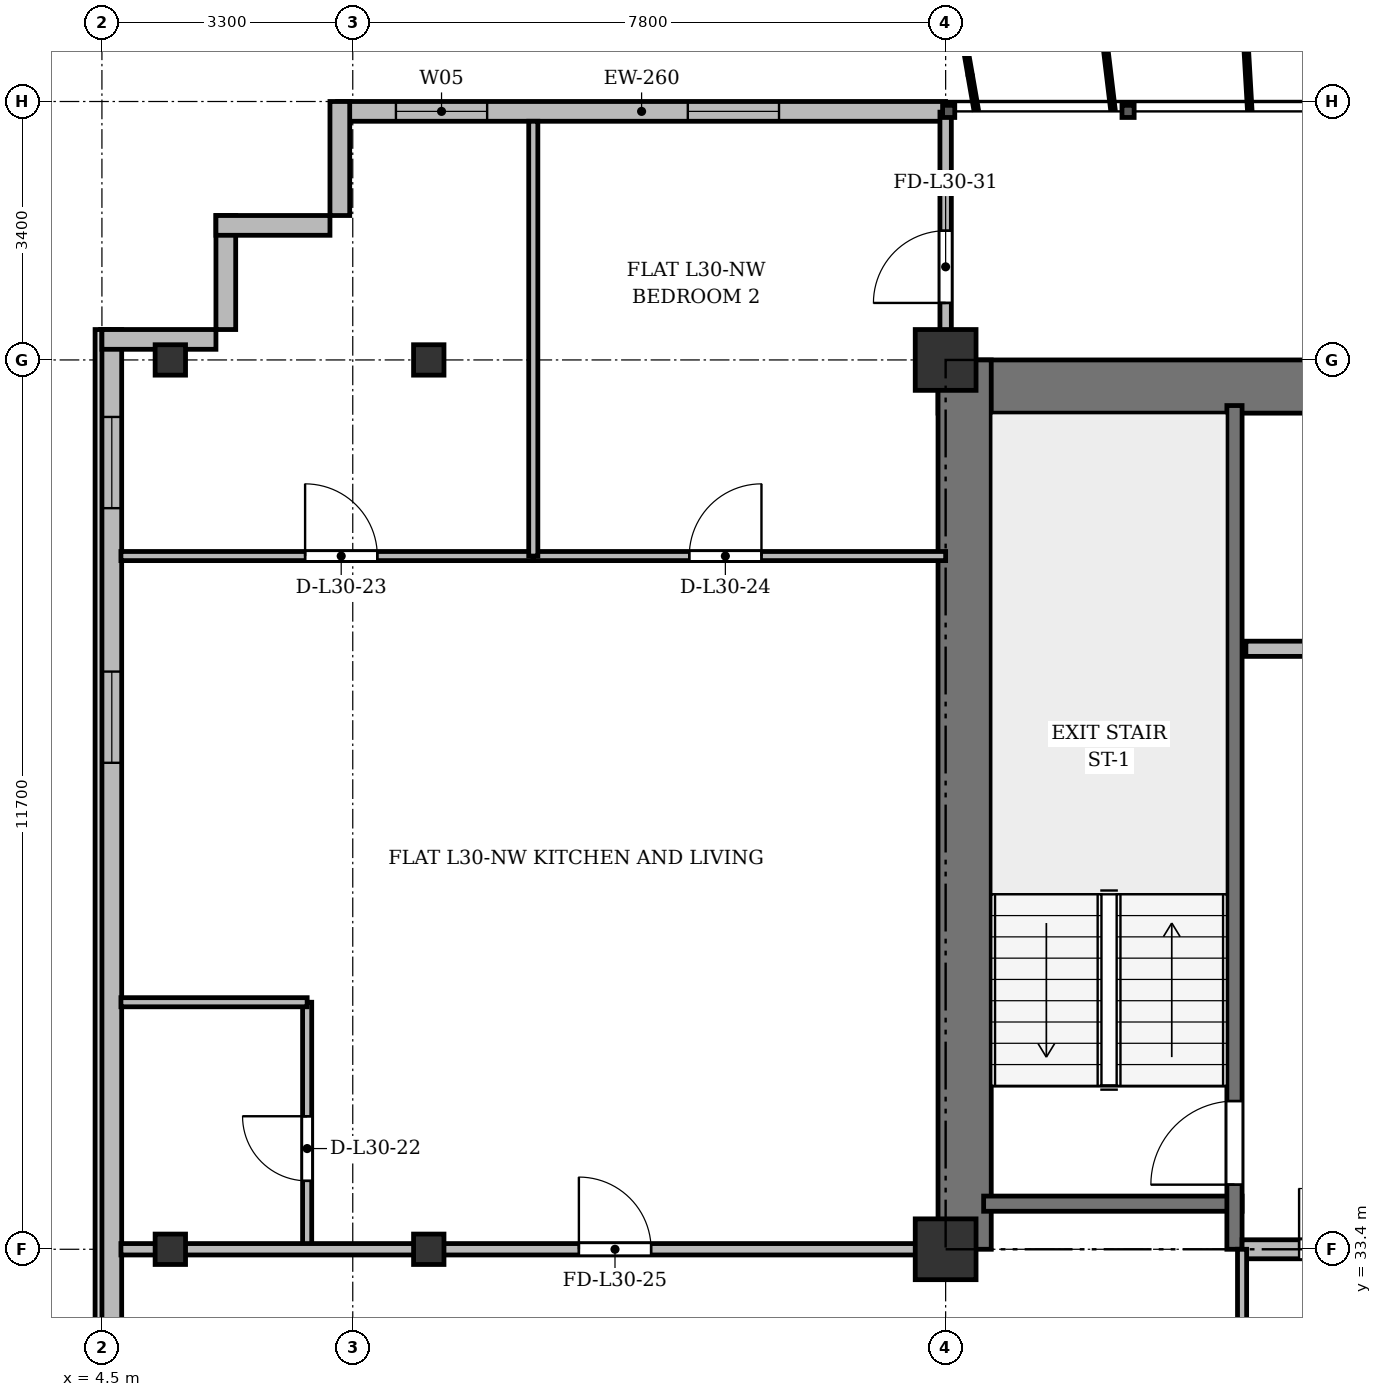
"""IFC4 building model, lengths in metres.
Left out: names, types, materials, properties, quantities, classifications, styles, units other than length and angle.
Written with IfcOpenShell. Run it as: python <this file> out.ifc"""

import sys

from ifc_helpers import new_model, si_unit, direction, frame, frame_2d, origin, origin_2d, place, context, subcontext, project, spatial, rectangle, i_section, extrude, source, transform, mapped, element, fill, save


model = new_model("IFC4")
c1 = context("Model", 3, precision=1e-05, world=origin(), true_north=direction((0.0, 1.0)))
c2 = subcontext(c1, "Body", "Model", "MODEL_VIEW")
j1 = project(units=[si_unit("LENGTHUNIT", "METRE"), si_unit("PLANEANGLEUNIT", "RADIAN")], contexts=[c1])
p1 = place(None, origin())
s1 = spatial("IfcSite", under=j1, at=p1, CompositionType="ELEMENT")
p2 = place(p1, origin())
s2 = spatial("IfcBuilding", under=s1, at=p2, CompositionType="ELEMENT")
p3 = place(p2, frame((0.0, 0.0, 117.7)))
s3 = spatial("IfcBuildingStorey", under=s2, at=p3, CompositionType="ELEMENT", Elevation=117.7)
m1 = source(origin(), c2, "Body", "SweptSolid", [
    extrude(i_section(OverallWidth=0.4, OverallDepth=0.4, WebThickness=0.022, FlangeThickness=0.035, at=origin_2d()), origin(), (0.0, 0.0, 1.0), 3.6),
])
for number, where, z_axis, x_axis in (
    (1, (5.4, 33.4, 0.0), (0.0, 0.0, 1.0), (1.0, 0.0, 0.0)),
    (2, (5.4, 45.1, 0.0), (0.0, 0.0, 1.0), (1.0, 0.0, 0.0)),
    (3, (8.8, 33.4, 0.0), (0.0, 0.0, 1.0), (1.0, 0.0, 0.0)),
    (4, (8.8, 45.1, 0.0), (0.0, 0.0, 1.0), (1.0, 0.0, 0.0)),
):
    element("IfcColumn", number, at=place(p3, frame(where, z_axis=z_axis, x_axis=x_axis)), inside=s3, PredefinedType="COLUMN", context=c2, shape_type="MappedRepresentation", body=[
        mapped(m1, transform((0.0, 0.0, 0.0), x_axis=(1.0, 0.0, 0.0), y_axis=(0.0, 1.0, 0.0), z_axis=(0.0, 0.0, 1.0), scale=1.0)),
    ])
m2 = source(origin(), c2, "Body", "SweptSolid", [
    extrude(rectangle(XDim=0.8, YDim=0.8, at=origin_2d()), origin(), (0.0, 0.0, 1.0), 3.6),
])
for number, where, z_axis, x_axis in (
    (5, (15.6, 33.4, 0.0), (0.0, 0.0, 1.0), (1.0, 0.0, 0.0)),
    (6, (15.6, 45.1, 0.0), (0.0, 0.0, 1.0), (1.0, 0.0, 0.0)),
):
    element("IfcColumn", number, at=place(p3, frame(where, z_axis=z_axis, x_axis=x_axis)), inside=s3, PredefinedType="COLUMN", context=c2, shape_type="MappedRepresentation", body=[
        mapped(m2, transform((0.0, 0.0, 0.0), x_axis=(1.0, 0.0, 0.0), y_axis=(0.0, 1.0, 0.0), z_axis=(0.0, 0.0, 1.0), scale=1.0)),
    ])
p4 = place(p3, frame((7.6, 48.37, 0.0), z_axis=(0.0, 0.0, 1.0), x_axis=(1.0, 0.0, 0.0)))
e7 = element("IfcWall", 7, at=p4, inside=s3, PredefinedType="SOLIDWALL", context=c2, shape_type="SweptSolid", body=[
    extrude(rectangle(XDim=8.0, YDim=0.26, at=frame_2d((4.0, 0.0))), origin(), (0.0, 0.0, 1.0), 3.34),
])
p5 = place(p4, frame((0.768, 0.0, 0.9)))
e8 = element("IfcOpeningElement", 8, at=p5, cuts=e7, PredefinedType="OPENING", context=c2, shape_type="SweptSolid", body=[
    extrude(rectangle(XDim=1.2, YDim=1.65, at=frame_2d((0.6, 0.825))), frame((0.0, 0.14, 0.0), z_axis=(0.0, -1.0, 0.0), x_axis=(1.0, 0.0, 0.0)), (0.0, 0.0, 1.0), 0.28),
])
p6 = place(p4, frame((4.608, 0.0, 0.9)))
e9 = element("IfcOpeningElement", 9, at=p6, cuts=e7, PredefinedType="OPENING", context=c2, shape_type="SweptSolid", body=[
    extrude(rectangle(XDim=1.2, YDim=1.65, at=frame_2d((0.6, 0.825))), frame((0.0, 0.14, 0.0), z_axis=(0.0, -1.0, 0.0), x_axis=(1.0, 0.0, 0.0)), (0.0, 0.0, 1.0), 0.28),
])
p7 = place(p3, frame((4.63, 5.9, 0.0), z_axis=(0.0, 0.0, 1.0), x_axis=(0.0, 1.0, 0.0)))
e10 = element("IfcWall", 10, at=p7, inside=s3, PredefinedType="SOLIDWALL", context=c2, shape_type="SweptSolid", body=[
    extrude(rectangle(XDim=39.6, YDim=0.26, at=frame_2d((19.8, 0.0))), origin(), (0.0, 0.0, 1.0), 3.34),
])
p8 = place(p7, frame((1.45, 0.0, 0.92)))
e11 = element("IfcOpeningElement", 11, at=p8, cuts=e10, PredefinedType="OPENING", context=c2, shape_type="SweptSolid", body=[
    extrude(rectangle(XDim=1.2, YDim=1.65, at=frame_2d((0.6, 0.825))), frame((0.0, 0.14, 0.0), z_axis=(0.0, -1.0, 0.0), x_axis=(1.0, 0.0, 0.0)), (0.0, 0.0, 1.0), 0.28),
])
p9 = place(p7, frame((4.2, 0.0, 0.92)))
e12 = element("IfcOpeningElement", 12, at=p9, cuts=e10, PredefinedType="OPENING", context=c2, shape_type="SweptSolid", body=[
    extrude(rectangle(XDim=2.6, YDim=1.9, at=frame_2d((1.3, 0.95))), frame((0.0, 0.14, 0.0), z_axis=(0.0, -1.0, 0.0), x_axis=(1.0, 0.0, 0.0)), (0.0, 0.0, 1.0), 0.28),
])
p10 = place(p7, frame((8.4, 0.0, 0.92)))
e13 = element("IfcOpeningElement", 13, at=p10, cuts=e10, PredefinedType="OPENING", context=c2, shape_type="SweptSolid", body=[
    extrude(rectangle(XDim=2.6, YDim=1.9, at=frame_2d((1.3, 0.95))), frame((0.0, 0.14, 0.0), z_axis=(0.0, -1.0, 0.0), x_axis=(1.0, 0.0, 0.0)), (0.0, 0.0, 1.0), 0.28),
])
p11 = place(p7, frame((15.6, 0.0, 0.92)))
e14 = element("IfcOpeningElement", 14, at=p11, cuts=e10, PredefinedType="OPENING", context=c2, shape_type="SweptSolid", body=[
    extrude(rectangle(XDim=2.6, YDim=1.9, at=frame_2d((1.3, 0.95))), frame((0.0, 0.14, 0.0), z_axis=(0.0, -1.0, 0.0), x_axis=(1.0, 0.0, 0.0)), (0.0, 0.0, 1.0), 0.28),
])
p12 = place(p7, frame((33.9, 0.0, 0.92)))
e15 = element("IfcOpeningElement", 15, at=p12, cuts=e10, PredefinedType="OPENING", context=c2, shape_type="SweptSolid", body=[
    extrude(rectangle(XDim=1.2, YDim=1.65, at=frame_2d((0.6, 0.825))), frame((0.0, 0.14, 0.0), z_axis=(0.0, -1.0, 0.0), x_axis=(1.0, 0.0, 0.0)), (0.0, 0.0, 1.0), 0.28),
])
p13 = place(p7, frame((37.25, 0.0, 0.92)))
e16 = element("IfcOpeningElement", 16, at=p13, cuts=e10, PredefinedType="OPENING", context=c2, shape_type="SweptSolid", body=[
    extrude(rectangle(XDim=1.2, YDim=1.65, at=frame_2d((0.6, 0.825))), frame((0.0, 0.14, 0.0), z_axis=(0.0, -1.0, 0.0), x_axis=(1.0, 0.0, 0.0)), (0.0, 0.0, 1.0), 0.28),
])
p14 = place(p3, frame((4.5, 45.37, 0.0), z_axis=(0.0, 0.0, 1.0), x_axis=(1.0, 0.0, 0.0)))
e17 = element("IfcWall", 17, at=p14, inside=s3, PredefinedType="SOLIDWALL", context=c2, shape_type="SweptSolid", body=[
    extrude(rectangle(XDim=1.5, YDim=0.26, at=frame_2d((0.75, 0.0))), origin(), (0.0, 0.0, 1.0), 2.752),
])
for number, where, z_axis, x_axis in (
    (18, (6.13, 45.5, 0.0), (0.0, 0.0, 1.0), (0.0, 1.0, 0.0)),
    (19, (6.0, 46.87, 0.0), (0.0, 0.0, 1.0), (1.0, 0.0, 0.0)),
    (20, (7.63, 47.0, 0.0), (0.0, 0.0, 1.0), (0.0, 1.0, 0.0)),
):
    element("IfcWall", number, at=place(p3, frame(where, z_axis=z_axis, x_axis=x_axis)), inside=s3, PredefinedType="SOLIDWALL", context=c2, shape_type="SweptSolid", body=[
        extrude(rectangle(XDim=1.5, YDim=0.26, at=frame_2d((0.75, 0.0))), origin(), (0.0, 0.0, 1.0), 3.34),
    ])
p15 = place(p3, frame((15.5, 44.75, 0.0), z_axis=(0.0, 0.0, 1.0), x_axis=(1.0, 0.0, 0.0)))
e21 = element("IfcWall", 21, at=p15, inside=s3, PredefinedType="SHEAR", context=c2, shape_type="SweptSolid", body=[
    extrude(rectangle(XDim=43.4, YDim=0.7, at=frame_2d((21.7, 0.0))), origin(), (0.0, 0.0, 1.0), 3.34),
])
p16 = place(p3, frame((15.85, 33.4, 0.0), z_axis=(0.0, 0.0, 1.0), x_axis=(0.0, 1.0, 0.0)))
e22 = element("IfcWall", 22, at=p16, inside=s3, PredefinedType="SHEAR", context=c2, shape_type="SweptSolid", body=[
    extrude(rectangle(XDim=11.7, YDim=0.7, at=frame_2d((5.85, 0.0))), origin(), (0.0, 0.0, 1.0), 3.34),
])
p17 = place(p3, frame((16.1, 34.0, 0.0), z_axis=(0.0, 0.0, 1.0), x_axis=(1.0, 0.0, 0.0)))
e23 = element("IfcWall", 23, at=p17, inside=s3, PredefinedType="SHEAR", context=c2, shape_type="SweptSolid", body=[
    extrude(rectangle(XDim=3.4, YDim=0.2, at=frame_2d((1.7, 0.0))), origin(), (0.0, 0.0, 1.0), 3.34),
])
p18 = place(p3, frame((19.4, 33.4, 0.0), z_axis=(0.0, 0.0, 1.0), x_axis=(0.0, 1.0, 0.0)))
e24 = element("IfcWall", 24, at=p18, inside=s3, PredefinedType="SHEAR", context=c2, shape_type="SweptSolid", body=[
    extrude(rectangle(XDim=11.1, YDim=0.2, at=frame_2d((5.55, 0.0))), origin(), (0.0, 0.0, 1.0), 3.34),
])
p19 = place(p18, frame((0.85, 0.0, 0.0)))
e25 = element("IfcOpeningElement", 25, at=p19, cuts=e24, PredefinedType="OPENING", context=c2, shape_type="SweptSolid", body=[
    extrude(rectangle(XDim=1.1, YDim=2.15, at=frame_2d((0.55, 1.075))), frame((0.0, 0.11, 0.0), z_axis=(0.0, -1.0, 0.0), x_axis=(1.0, 0.0, 0.0)), (0.0, 0.0, 1.0), 0.22),
])
p20 = place(p3, frame((19.55, 41.3, 0.0), z_axis=(0.0, 0.0, 1.0), x_axis=(1.0, 0.0, 0.0)))
e26 = element("IfcWall", 26, at=p20, inside=s3, PredefinedType="SOLIDWALL", context=c2, shape_type="SweptSolid", body=[
    extrude(rectangle(XDim=6.75, YDim=0.2, at=frame_2d((3.375, 0.0))), origin(), (0.0, 0.0, 1.0), 3.34),
])
p21 = place(p20, frame((1.7, 0.0, 0.0)))
e27 = element("IfcOpeningElement", 27, at=p21, cuts=e26, PredefinedType="OPENING", context=c2, shape_type="SweptSolid", body=[
    extrude(rectangle(XDim=1.1, YDim=2.15, at=frame_2d((0.55, 1.075))), frame((0.0, 0.11, 0.0), z_axis=(0.0, -1.0, 0.0), x_axis=(1.0, 0.0, 0.0)), (0.0, 0.0, 1.0), 0.22),
])
p22 = place(p20, frame((4.4, 0.0, 0.0)))
e28 = element("IfcOpeningElement", 28, at=p22, cuts=e26, PredefinedType="OPENING", context=c2, shape_type="SweptSolid", body=[
    extrude(rectangle(XDim=1.1, YDim=2.15, at=frame_2d((0.55, 1.075))), frame((0.0, 0.11, 0.0), z_axis=(0.0, -1.0, 0.0), x_axis=(1.0, 0.0, 0.0)), (0.0, 0.0, 1.0), 0.22),
])
p23 = place(p3, frame((19.5, 33.4, 0.0), z_axis=(0.0, 0.0, 1.0), x_axis=(1.0, 0.0, 0.0)))
e29 = element("IfcWall", 29, at=p23, inside=s3, PredefinedType="PARTITIONING", context=c2, shape_type="SweptSolid", body=[
    extrude(rectangle(XDim=6.8, YDim=0.25, at=frame_2d((3.4, 0.0))), origin(), (0.0, 0.0, 1.0), 2.752),
])
p24 = place(p23, frame((0.75, 0.0, 0.0)))
e30 = element("IfcOpeningElement", 30, at=p24, cuts=e29, PredefinedType="OPENING", context=c2, shape_type="SweptSolid", body=[
    extrude(rectangle(XDim=1.6, YDim=2.2, at=frame_2d((0.8, 1.1))), frame((0.0, 0.135, 0.0), z_axis=(0.0, -1.0, 0.0), x_axis=(1.0, 0.0, 0.0)), (0.0, 0.0, 1.0), 0.27),
])
p25 = place(p3, frame((19.5, 29.8, 0.0), z_axis=(0.0, 0.0, 1.0), x_axis=(0.0, 1.0, 0.0)))
e31 = element("IfcWall", 31, at=p25, inside=s3, PredefinedType="PARTITIONING", context=c2, shape_type="SweptSolid", body=[
    extrude(rectangle(XDim=3.6, YDim=0.12, at=frame_2d((1.8, 0.0))), origin(), (0.0, 0.0, 1.0), 2.752),
])
p26 = place(p3, frame((7.2, 33.4, 0.0), z_axis=(0.0, 0.0, 1.0), x_axis=(0.0, 1.0, 0.0)))
e32 = element("IfcWall", 32, at=p26, inside=s3, PredefinedType="PARTITIONING", context=c2, shape_type="SweptSolid", body=[
    extrude(rectangle(XDim=3.25, YDim=0.12, at=frame_2d((1.625, 0.0))), origin(), (0.0, 0.0, 1.0), 2.752),
])
p27 = place(p26, frame((0.9, 0.0, 0.0)))
e33 = element("IfcOpeningElement", 33, at=p27, cuts=e32, PredefinedType="OPENING", context=c2, shape_type="SweptSolid", body=[
    extrude(rectangle(XDim=0.85, YDim=2.1, at=frame_2d((0.425, 1.05))), frame((0.0, 0.07, 0.0), z_axis=(0.0, -1.0, 0.0), x_axis=(1.0, 0.0, 0.0)), (0.0, 0.0, 1.0), 0.14),
])
p28 = place(p3, frame((4.75, 36.65, 0.0), z_axis=(0.0, 0.0, 1.0), x_axis=(1.0, 0.0, 0.0)))
e34 = element("IfcWall", 34, at=p28, inside=s3, PredefinedType="PARTITIONING", context=c2, shape_type="SweptSolid", body=[
    extrude(rectangle(XDim=2.45, YDim=0.12, at=frame_2d((1.225, 0.0))), origin(), (0.0, 0.0, 1.0), 2.84),
])
p29 = place(p3, frame((4.75, 42.52, 0.0), z_axis=(0.0, 0.0, 1.0), x_axis=(1.0, 0.0, 0.0)))
e35 = element("IfcWall", 35, at=p29, inside=s3, PredefinedType="PARTITIONING", context=c2, shape_type="SweptSolid", body=[
    extrude(rectangle(XDim=5.425, YDim=0.12, at=frame_2d((2.712, 0.0))), origin(), (0.0, 0.0, 1.0), 2.84),
])
p30 = place(p29, frame((2.423, 0.0, 0.0)))
e36 = element("IfcOpeningElement", 36, at=p30, cuts=e35, PredefinedType="OPENING", context=c2, shape_type="SweptSolid", body=[
    extrude(rectangle(XDim=0.95, YDim=2.15, at=frame_2d((0.475, 1.075))), frame((0.0, 0.07, 0.0), z_axis=(0.0, -1.0, 0.0), x_axis=(1.0, 0.0, 0.0)), (0.0, 0.0, 1.0), 0.14),
])
p31 = place(p3, frame((10.175, 42.52, 0.0), z_axis=(0.0, 0.0, 1.0), x_axis=(1.0, 0.0, 0.0)))
e37 = element("IfcWall", 37, at=p31, inside=s3, PredefinedType="PARTITIONING", context=c2, shape_type="SweptSolid", body=[
    extrude(rectangle(XDim=5.425, YDim=0.12, at=frame_2d((2.712, 0.0))), origin(), (0.0, 0.0, 1.0), 2.84),
])
p32 = place(p31, frame((2.052, 0.0, 0.0)))
e38 = element("IfcOpeningElement", 38, at=p32, cuts=e37, PredefinedType="OPENING", context=c2, shape_type="SweptSolid", body=[
    extrude(rectangle(XDim=0.95, YDim=2.15, at=frame_2d((0.475, 1.075))), frame((0.0, 0.07, 0.0), z_axis=(0.0, -1.0, 0.0), x_axis=(1.0, 0.0, 0.0)), (0.0, 0.0, 1.0), 0.14),
])
p33 = place(p3, frame((10.175, 42.52, 0.0), z_axis=(0.0, 0.0, 1.0), x_axis=(0.0, 1.0, 0.0)))
e39 = element("IfcWall", 39, at=p33, inside=s3, PredefinedType="PARTITIONING", context=c2, shape_type="SweptSolid", body=[
    extrude(rectangle(XDim=5.72, YDim=0.12, at=frame_2d((2.86, 0.0))), origin(), (0.0, 0.0, 1.0), 2.752),
])
p34 = place(p3, frame((4.75, 33.4, 0.0), z_axis=(0.0, 0.0, 1.0), x_axis=(1.0, 0.0, 0.0)))
e40 = element("IfcWall", 40, at=p34, inside=s3, PredefinedType="PARTITIONING", context=c2, shape_type="SweptSolid", body=[
    extrude(rectangle(XDim=10.85, YDim=0.15, at=frame_2d((5.425, 0.0))), origin(), (0.0, 0.0, 1.0), 2.752),
])
p35 = place(p34, frame((6.025, 0.0, 0.0)))
e41 = element("IfcOpeningElement", 41, at=p35, cuts=e40, PredefinedType="OPENING", context=c2, shape_type="SweptSolid", body=[
    extrude(rectangle(XDim=0.95, YDim=2.15, at=frame_2d((0.475, 1.075))), frame((0.0, 0.085, 0.0), z_axis=(0.0, -1.0, 0.0), x_axis=(1.0, 0.0, 0.0)), (0.0, 0.0, 1.0), 0.17),
])
p36 = place(p3, frame((15.6, 44.75, 0.0), z_axis=(0.0, 0.0, 1.0), x_axis=(0.0, 1.0, 0.0)))
e42 = element("IfcWall", 42, at=p36, inside=s3, PredefinedType="PARTITIONING", context=c2, shape_type="SweptSolid", body=[
    extrude(rectangle(XDim=3.61, YDim=0.15, at=frame_2d((1.805, 0.0))), origin(), (0.0, 0.0, 1.0), 2.84),
])
p37 = place(p36, frame((1.1, 0.0, 0.0)))
e43 = element("IfcOpeningElement", 43, at=p37, cuts=e42, PredefinedType="OPENING", context=c2, shape_type="SweptSolid", body=[
    extrude(rectangle(XDim=0.95, YDim=2.15, at=frame_2d((0.475, 1.075))), frame((0.0, 0.085, 0.0), z_axis=(0.0, -1.0, 0.0), x_axis=(1.0, 0.0, 0.0)), (0.0, 0.0, 1.0), 0.17),
])
m3 = source(origin(), c2, "Body", "SweptSolid", [
    extrude(rectangle(XDim=1.2, YDim=1.65, at=frame_2d((0.6, 0.825))), frame((0.0, 0.03, 0.0), z_axis=(0.0, -1.0, 0.0), x_axis=(1.0, 0.0, 0.0)), (0.0, 0.0, 1.0), 0.06),
])
p38 = place(p5, origin())
e44 = element("IfcWindow", 44, at=p38, inside=s3, PartitioningType="SINGLE_PANEL", PredefinedType="WINDOW", context=c2, shape_type="MappedRepresentation", body=[
    mapped(m3, transform((0.0, 0.0, 0.0), x_axis=(1.0, 0.0, 0.0), y_axis=(0.0, 1.0, 0.0), z_axis=(0.0, 0.0, 1.0), scale=1.0)),
])
fill(e8, e44)
p39 = place(p6, origin())
e45 = element("IfcWindow", 45, at=p39, inside=s3, PartitioningType="SINGLE_PANEL", PredefinedType="WINDOW", context=c2, shape_type="MappedRepresentation", body=[
    mapped(m3, transform((0.0, 0.0, 0.0), x_axis=(1.0, 0.0, 0.0), y_axis=(0.0, 1.0, 0.0), z_axis=(0.0, 0.0, 1.0), scale=1.0)),
])
fill(e9, e45)
p40 = place(p12, origin())
e46 = element("IfcWindow", 46, at=p40, inside=s3, PartitioningType="SINGLE_PANEL", PredefinedType="WINDOW", context=c2, shape_type="MappedRepresentation", body=[
    mapped(m3, transform((0.0, 0.0, 0.0), x_axis=(1.0, 0.0, 0.0), y_axis=(0.0, 1.0, 0.0), z_axis=(0.0, 0.0, 1.0), scale=1.0)),
])
fill(e15, e46)
p41 = place(p13, origin())
e47 = element("IfcWindow", 47, at=p41, inside=s3, PartitioningType="SINGLE_PANEL", PredefinedType="WINDOW", context=c2, shape_type="MappedRepresentation", body=[
    mapped(m3, transform((0.0, 0.0, 0.0), x_axis=(1.0, 0.0, 0.0), y_axis=(0.0, 1.0, 0.0), z_axis=(0.0, 0.0, 1.0), scale=1.0)),
])
fill(e16, e47)
m4 = source(origin(), c2, "Body", "SweptSolid", [
    extrude(rectangle(XDim=1.1, YDim=2.15, at=frame_2d((0.55, 1.075))), frame((0.0, 0.025, 0.0), z_axis=(0.0, -1.0, 0.0), x_axis=(1.0, 0.0, 0.0)), (0.0, 0.0, 1.0), 0.05),
])
p42 = place(p19, origin())
e48 = element("IfcDoor", 48, at=p42, inside=s3, OperationType="SINGLE_SWING_LEFT", PredefinedType="DOOR", context=c2, shape_type="MappedRepresentation", body=[
    mapped(m4, transform((0.0, 0.0, 0.0), x_axis=(1.0, 0.0, 0.0), y_axis=(0.0, 1.0, 0.0), z_axis=(0.0, 0.0, 1.0), scale=1.0)),
])
fill(e25, e48)
m5 = source(origin(), c2, "Body", "SweptSolid", [
    extrude(rectangle(XDim=1.6, YDim=2.2, at=frame_2d((0.8, 1.1))), frame((0.0, 0.025, 0.0), z_axis=(0.0, -1.0, 0.0), x_axis=(1.0, 0.0, 0.0)), (0.0, 0.0, 1.0), 0.05),
])
p43 = place(p24, origin())
e49 = element("IfcDoor", 49, at=p43, inside=s3, OperationType="DOUBLE_DOOR_SINGLE_SWING", PredefinedType="DOOR", context=c2, shape_type="MappedRepresentation", body=[
    mapped(m5, transform((0.0, 0.0, 0.0), x_axis=(1.0, 0.0, 0.0), y_axis=(0.0, 1.0, 0.0), z_axis=(0.0, 0.0, 1.0), scale=1.0)),
])
fill(e30, e49)
m6 = source(origin(), c2, "Body", "SweptSolid", [
    extrude(rectangle(XDim=0.85, YDim=2.1, at=frame_2d((0.425, 1.05))), frame((0.0, 0.025, 0.0), z_axis=(0.0, -1.0, 0.0), x_axis=(1.0, 0.0, 0.0)), (0.0, 0.0, 1.0), 0.05),
])
p44 = place(p27, origin())
e50 = element("IfcDoor", 50, at=p44, inside=s3, OperationType="SINGLE_SWING_RIGHT", PredefinedType="DOOR", context=c2, shape_type="MappedRepresentation", body=[
    mapped(m6, transform((0.0, 0.0, 0.0), x_axis=(1.0, 0.0, 0.0), y_axis=(0.0, 1.0, 0.0), z_axis=(0.0, 0.0, 1.0), scale=1.0)),
])
fill(e33, e50)
m7 = source(origin(), c2, "Body", "SweptSolid", [
    extrude(rectangle(XDim=0.95, YDim=2.15, at=frame_2d((0.475, 1.075))), frame((0.0, 0.025, 0.0), z_axis=(0.0, -1.0, 0.0), x_axis=(1.0, 0.0, 0.0)), (0.0, 0.0, 1.0), 0.05),
])
p45 = place(p30, origin())
e51 = element("IfcDoor", 51, at=p45, inside=s3, OperationType="SINGLE_SWING_LEFT", PredefinedType="DOOR", context=c2, shape_type="MappedRepresentation", body=[
    mapped(m7, transform((0.0, 0.0, 0.0), x_axis=(1.0, 0.0, 0.0), y_axis=(0.0, 1.0, 0.0), z_axis=(0.0, 0.0, 1.0), scale=1.0)),
])
fill(e36, e51)
p46 = place(p32, origin())
e52 = element("IfcDoor", 52, at=p46, inside=s3, OperationType="SINGLE_SWING_RIGHT", PredefinedType="DOOR", context=c2, shape_type="MappedRepresentation", body=[
    mapped(m7, transform((0.0, 0.0, 0.0), x_axis=(1.0, 0.0, 0.0), y_axis=(0.0, 1.0, 0.0), z_axis=(0.0, 0.0, 1.0), scale=1.0)),
])
fill(e38, e52)
p47 = place(p35, origin())
e53 = element("IfcDoor", 53, at=p47, inside=s3, OperationType="SINGLE_SWING_LEFT", PredefinedType="DOOR", context=c2, shape_type="MappedRepresentation", body=[
    mapped(m7, transform((0.0, 0.0, 0.0), x_axis=(1.0, 0.0, 0.0), y_axis=(0.0, 1.0, 0.0), z_axis=(0.0, 0.0, 1.0), scale=1.0)),
])
fill(e41, e53)
p48 = place(p37, origin())
e54 = element("IfcDoor", 54, at=p48, inside=s3, OperationType="SINGLE_SWING_LEFT", PredefinedType="DOOR", context=c2, shape_type="MappedRepresentation", body=[
    mapped(m7, transform((0.0, 0.0, 0.0), x_axis=(1.0, 0.0, 0.0), y_axis=(0.0, 1.0, 0.0), z_axis=(0.0, 0.0, 1.0), scale=1.0)),
])
fill(e43, e54)
save(model, sys.argv[1])
